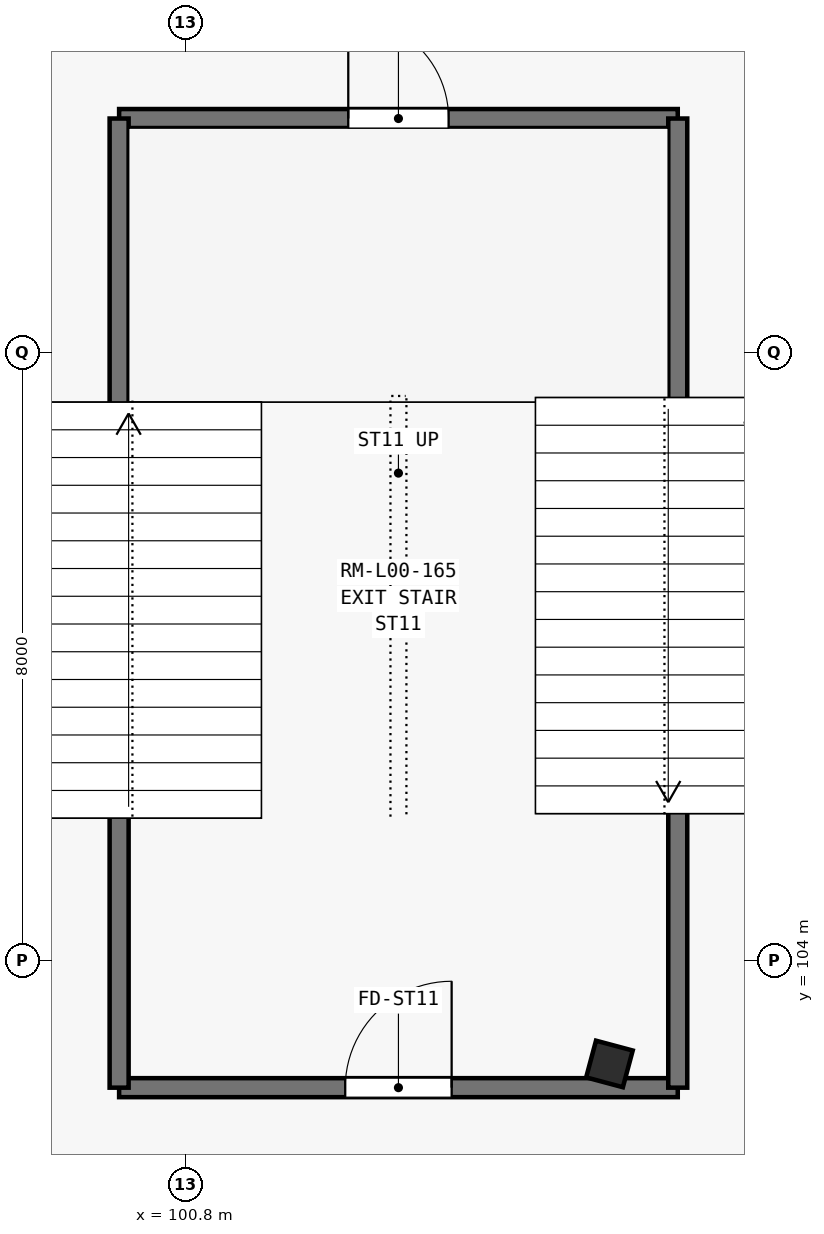
"""IFC4 building model, lengths in metres.
Left out: names, types, materials, properties, quantities, classifications, styles, units other than length and angle.
Written with IfcOpenShell. Run it as: python <this file> out.ifc"""

import sys

from ifc_helpers import new_model, si_unit, direction, frame, frame_2d, origin, origin_2d, place, context, subcontext, project, spatial, rectangle, i_section, extrude, element, fill, save


model = new_model("IFC4")
c1 = context("Model", 3, precision=1e-05, world=origin(), true_north=direction((0.0, 1.0)))
c2 = subcontext(c1, "Body", "Model", "MODEL_VIEW")
j1 = project(units=[si_unit("LENGTHUNIT", "METRE"), si_unit("PLANEANGLEUNIT", "RADIAN")], contexts=[c1])
p1 = place(None, origin())
s1 = spatial("IfcSite", under=j1, at=p1, CompositionType="ELEMENT")
p2 = place(p1, origin())
s2 = spatial("IfcBuilding", under=s1, at=p2, CompositionType="ELEMENT")
p3 = place(p2, origin())
s3 = spatial("IfcBuildingStorey", under=s2, at=p3, CompositionType="ELEMENT", Elevation=0.0)
p4 = place(p3, frame((106.376, 102.637, 0.0), z_axis=(0.0, 0.0, 1.0), x_axis=(0.258819045103, 0.965925826289, 0.0)))
e1 = element("IfcColumn", 1, at=p4, inside=s3, PredefinedType="COLUMN", context=c2, shape_type="SweptSolid", body=[
    extrude(i_section(OverallWidth=0.5, OverallDepth=0.5, WebThickness=0.025, FlangeThickness=0.042, at=origin_2d()), origin(), (0.0, 0.0, 1.0), 5.4),
])
p5 = place(p3, frame((99.925, 102.325, 0.0), z_axis=(0.0, 0.0, 1.0), x_axis=(1.0, 0.0, 0.0)))
e2 = element("IfcWall", 2, at=p5, inside=s3, PredefinedType="SHEAR", context=c2, shape_type="SweptSolid", body=[
    extrude(rectangle(XDim=7.35, YDim=0.25, at=frame_2d((3.675, 0.0))), origin(), (0.0, 0.0, 1.0), 5.4),
])
p6 = place(p5, frame((2.975, 0.0, 0.0)))
e3 = element("IfcOpeningElement", 3, at=p6, cuts=e2, PredefinedType="OPENING", context=c2, shape_type="SweptSolid", body=[
    extrude(rectangle(XDim=1.4, YDim=2.2, at=frame_2d((0.7, 1.1))), frame((0.0, 0.135, 0.0), z_axis=(0.0, -1.0, 0.0), x_axis=(1.0, 0.0, 0.0)), (0.0, 0.0, 1.0), 0.27),
])
p7 = place(p3, frame((99.925, 115.075, 0.0), z_axis=(0.0, 0.0, 1.0), x_axis=(1.0, 0.0, 0.0)))
e4 = element("IfcWall", 4, at=p7, inside=s3, PredefinedType="SHEAR", context=c2, shape_type="SweptSolid", body=[
    extrude(rectangle(XDim=7.35, YDim=0.25, at=frame_2d((3.675, 0.0))), origin(), (0.0, 0.0, 1.0), 5.4),
])
p8 = place(p7, frame((3.015, 0.0, 0.0)))
e5 = element("IfcOpeningElement", 5, at=p8, cuts=e4, PredefinedType="OPENING", context=c2, shape_type="SweptSolid", body=[
    extrude(rectangle(XDim=1.32, YDim=2.2, at=frame_2d((0.66, 1.1))), frame((0.0, 0.135, 0.0), z_axis=(0.0, -1.0, 0.0), x_axis=(1.0, 0.0, 0.0)), (0.0, 0.0, 1.0), 0.27),
])
for number, where, z_axis, x_axis in (
    (6, (99.925, 102.325, 0.0), (0.0, 0.0, 1.0), (0.0, 1.0, 0.0)),
    (7, (107.275, 102.325, 0.0), (0.0, 0.0, 1.0), (0.0, 1.0, 0.0)),
):
    element("IfcWall", number, at=place(p3, frame(where, z_axis=z_axis, x_axis=x_axis)), inside=s3, PredefinedType="SHEAR", context=c2, shape_type="SweptSolid", body=[
        extrude(rectangle(XDim=12.75, YDim=0.25, at=frame_2d((6.375, 0.0))), origin(), (0.0, 0.0, 1.0), 5.4),
    ])
p9 = place(p3, frame((116.225, 109.2, 0.0), z_axis=(0.0, 0.0, 1.0), x_axis=(-1.0, 0.0, 0.0)))
e8 = element("IfcWall", 8, at=p9, inside=s3, PredefinedType="SOLIDWALL", context=c2, shape_type="SweptSolid", body=[
    extrude(rectangle(XDim=8.45, YDim=0.22, at=frame_2d((4.225, 0.0))), origin(), (0.0, 0.0, 1.0), 4.483),
])
p10 = place(p3, frame((99.425, 109.2, 0.0), z_axis=(0.0, 0.0, 1.0), x_axis=(-1.0, 0.0, 0.0)))
e9 = element("IfcWall", 9, at=p10, inside=s3, PredefinedType="SOLIDWALL", context=c2, shape_type="SweptSolid", body=[
    extrude(rectangle(XDim=14.05, YDim=0.22, at=frame_2d((7.025, 0.0))), origin(), (0.0, 0.0, 1.0), 4.483),
])
p11 = place(p10, frame((6.365, 0.0, 0.0)))
e10 = element("IfcOpeningElement", 10, at=p11, cuts=e9, PredefinedType="OPENING", context=c2, shape_type="SweptSolid", body=[
    extrude(rectangle(XDim=1.32, YDim=2.2, at=frame_2d((0.66, 1.1))), frame((0.0, 0.12, 0.0), z_axis=(0.0, -1.0, 0.0), x_axis=(1.0, 0.0, 0.0)), (0.0, 0.0, 1.0), 0.24),
])
p12 = place(p6, origin())
e11 = element("IfcDoor", 11, at=p12, inside=s3, OperationType="SINGLE_SWING_RIGHT", PredefinedType="DOOR", context=c2, shape_type="SweptSolid", body=[
    extrude(rectangle(XDim=1.4, YDim=2.2, at=frame_2d((0.7, 1.1))), frame((0.0, 0.025, 0.0), z_axis=(0.0, -1.0, 0.0), x_axis=(1.0, 0.0, 0.0)), (0.0, 0.0, 1.0), 0.05),
])
fill(e3, e11)
p13 = place(p8, origin())
e12 = element("IfcDoor", 12, at=p13, inside=s3, OperationType="SINGLE_SWING_LEFT", PredefinedType="DOOR", context=c2, shape_type="SweptSolid", body=[
    extrude(rectangle(XDim=1.32, YDim=2.2, at=frame_2d((0.66, 1.1))), frame((0.0, 0.025, 0.0), z_axis=(0.0, -1.0, 0.0), x_axis=(1.0, 0.0, 0.0)), (0.0, 0.0, 1.0), 0.05),
])
fill(e5, e12)
save(model, sys.argv[1])
